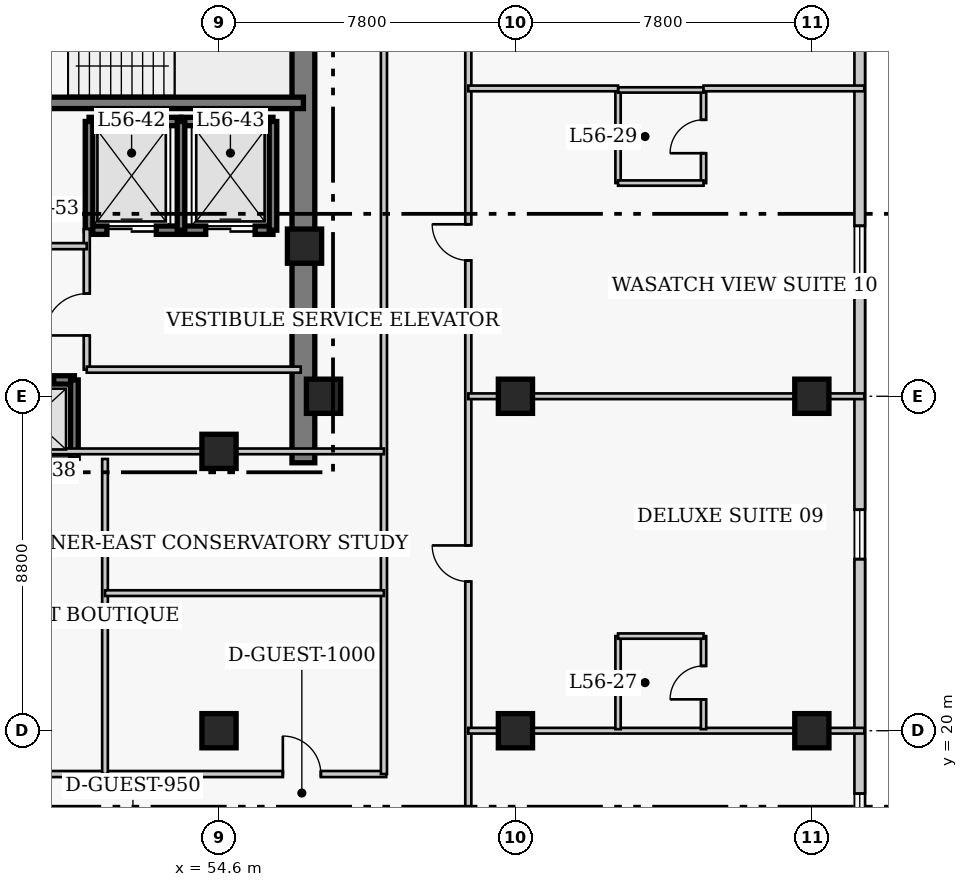
"""IFC4 building model, lengths in metres.
Left out: names, types, materials, properties, quantities, classifications, styles, units other than length and angle.
Written with IfcOpenShell. Run it as: python <this file> out.ifc"""

import sys

from ifc_helpers import new_model, si_unit, direction, frame, frame_2d, origin, origin_2d, place, context, subcontext, project, spatial, rectangle, extrude, element, fill, save


model = new_model("IFC4")
c1 = context("Model", 3, precision=1e-05, world=origin(), true_north=direction((0.0, 1.0)))
c2 = subcontext(c1, "Body", "Model", "MODEL_VIEW")
j1 = project(units=[si_unit("LENGTHUNIT", "METRE"), si_unit("PLANEANGLEUNIT", "RADIAN")], contexts=[c1])
p1 = place(None, origin())
s1 = spatial("IfcSite", under=j1, at=p1, CompositionType="ELEMENT")
p2 = place(p1, origin())
s2 = spatial("IfcBuilding", under=s1, at=p2, CompositionType="ELEMENT")
p3 = place(p2, frame((0.0, 0.0, 224.1)))
s3 = spatial("IfcBuildingStorey", under=s2, at=p3, CompositionType="ELEMENT", Elevation=224.1)
p4 = place(p3, frame((56.82, 27.05, 0.0), z_axis=(0.0, 0.0, 1.0), x_axis=(0.0, 1.0, 0.0)))
e1 = element("IfcWall", 1, at=p4, inside=s3, PredefinedType="SHEAR", context=c2, shape_type="SweptSolid", body=[
    extrude(rectangle(XDim=13.57, YDim=0.6, at=frame_2d((6.785, 0.0))), origin(), (0.0, 0.0, 1.0), 3.9),
])
p5 = place(p3, frame((48.45, 36.52, 0.0), z_axis=(0.0, 0.0, 1.0), x_axis=(1.0, 0.0, 0.0)))
e2 = element("IfcWall", 2, at=p5, inside=s3, PredefinedType="SHEAR", context=c2, shape_type="SweptSolid", body=[
    extrude(rectangle(XDim=8.37, YDim=0.3, at=frame_2d((4.185, 0.0))), origin(), (0.0, 0.0, 1.0), 3.9),
])
for number, where, z_axis, x_axis in (
    (3, (54.6, 20.0, 0.0), (0.0, 0.0, 1.0), (1.0, 0.0, 0.0)),
    (4, (62.4, 20.0, 0.0), (0.0, 0.0, 1.0), (1.0, 0.0, 0.0)),
    (5, (62.4, 28.8, 0.0), (0.0, 0.0, 1.0), (1.0, 0.0, 0.0)),
    (6, (70.2, 20.0, 0.0), (0.0, 0.0, 1.0), (1.0, 0.0, 0.0)),
    (7, (70.2, 28.8, 0.0), (0.0, 0.0, 1.0), (1.0, 0.0, 0.0)),
    (8, (57.35, 28.8, 0.0), (0.0, 0.0, 1.0), (1.0, 0.0, 0.0)),
    (9, (54.6, 27.35, 0.0), (0.0, 0.0, 1.0), (1.0, 0.0, 0.0)),
    (10, (56.85, 32.75, 0.0), (0.0, 0.0, 1.0), (1.0, 0.0, 0.0)),
):
    element("IfcColumn", number, at=place(p3, frame(where, z_axis=z_axis, x_axis=x_axis)), inside=s3, PredefinedType="COLUMN", context=c2, shape_type="SweptSolid", body=[
        extrude(rectangle(XDim=0.9, YDim=0.9, at=origin_2d()), origin(), (0.0, 0.0, 1.0), 3.9),
    ])
p6 = place(p3, frame((71.46, 13.96, 0.0), z_axis=(0.0, 0.0, 1.0), x_axis=(0.0, 1.0, 0.0)))
e11 = element("IfcWall", 11, at=p6, inside=s3, PredefinedType="SOLIDWALL", context=c2, shape_type="SweptSolid", body=[
    extrude(rectangle(XDim=29.88, YDim=0.28, at=frame_2d((14.94, 0.0))), origin(), (0.0, 0.0, 1.0), 3.65),
])
p7 = place(p6, frame((3.085, 0.0, 0.85)))
e12 = element("IfcOpeningElement", 12, at=p7, cuts=e11, PredefinedType="OPENING", context=c2, shape_type="SweptSolid", body=[
    extrude(rectangle(XDim=1.3, YDim=1.7, at=frame_2d((0.65, 0.85))), frame((0.0, 0.15, 0.0), z_axis=(0.0, -1.0, 0.0), x_axis=(1.0, 0.0, 0.0)), (0.0, 0.0, 1.0), 0.3),
])
p8 = place(p6, frame((10.555, 0.0, 0.85)))
e13 = element("IfcOpeningElement", 13, at=p8, cuts=e11, PredefinedType="OPENING", context=c2, shape_type="SweptSolid", body=[
    extrude(rectangle(XDim=1.3, YDim=1.7, at=frame_2d((0.65, 0.85))), frame((0.0, 0.15, 0.0), z_axis=(0.0, -1.0, 0.0), x_axis=(1.0, 0.0, 0.0)), (0.0, 0.0, 1.0), 0.3),
])
p9 = place(p6, frame((18.025, 0.0, 0.85)))
e14 = element("IfcOpeningElement", 14, at=p9, cuts=e11, PredefinedType="OPENING", context=c2, shape_type="SweptSolid", body=[
    extrude(rectangle(XDim=1.3, YDim=1.7, at=frame_2d((0.65, 0.85))), frame((0.0, 0.15, 0.0), z_axis=(0.0, -1.0, 0.0), x_axis=(1.0, 0.0, 0.0)), (0.0, 0.0, 1.0), 0.3),
])
p10 = place(p6, frame((25.495, 0.0, 0.85)))
e15 = element("IfcOpeningElement", 15, at=p10, cuts=e11, PredefinedType="OPENING", context=c2, shape_type="SweptSolid", body=[
    extrude(rectangle(XDim=1.3, YDim=1.7, at=frame_2d((0.65, 0.85))), frame((0.0, 0.15, 0.0), z_axis=(0.0, -1.0, 0.0), x_axis=(1.0, 0.0, 0.0)), (0.0, 0.0, 1.0), 0.3),
])
p11 = place(p3, frame((48.55, 29.23, 0.0), z_axis=(0.0, 0.0, 1.0), x_axis=(1.0, 0.0, 0.0)))
e16 = element("IfcWall", 16, at=p11, inside=s3, PredefinedType="SHEAR", context=c2, shape_type="SweptSolid", body=[
    extrude(rectangle(XDim=2.245, YDim=0.22, at=frame_2d((1.123, 0.0))), origin(), (0.0, 0.0, 1.0), 3.9),
])
p12 = place(p11, frame((0.6, 0.0, 0.0)))
e17 = element("IfcOpeningElement", 17, at=p12, cuts=e16, PredefinedType="OPENING", context=c2, shape_type="SweptSolid", body=[
    extrude(rectangle(XDim=1.1, YDim=2.15, at=frame_2d((0.55, 1.075))), frame((0.0, 0.12, 0.0), z_axis=(0.0, -1.0, 0.0), x_axis=(1.0, 0.0, 0.0)), (0.0, 0.0, 1.0), 0.24),
])
p13 = place(p3, frame((48.55, 27.17, 0.0), z_axis=(0.0, 0.0, 1.0), x_axis=(1.0, 0.0, 0.0)))
e18 = element("IfcWall", 18, at=p13, inside=s3, PredefinedType="SHEAR", context=c2, shape_type="SweptSolid", body=[
    extrude(rectangle(XDim=2.245, YDim=0.22, at=frame_2d((1.123, 0.0))), origin(), (0.0, 0.0, 1.0), 3.9),
])
p14 = place(p3, frame((50.795, 27.17, 0.0), z_axis=(0.0, 0.0, 1.0), x_axis=(0.0, 1.0, 0.0)))
e19 = element("IfcWall", 19, at=p14, inside=s3, PredefinedType="SHEAR", context=c2, shape_type="SweptSolid", body=[
    extrude(rectangle(XDim=2.06, YDim=0.2, at=frame_2d((1.03, 0.0))), origin(), (0.0, 0.0, 1.0), 3.9),
])
p15 = place(p3, frame((51.18, 36.03, 0.0), z_axis=(0.0, 0.0, 1.0), x_axis=(1.0, 0.0, 0.0)))
e20 = element("IfcWall", 20, at=p15, inside=s3, PredefinedType="SHEAR", context=c2, shape_type="SweptSolid", body=[
    extrude(rectangle(XDim=2.42, YDim=0.22, at=frame_2d((1.21, 0.0))), origin(), (0.0, 0.0, 1.0), 3.9),
])
p16 = place(p3, frame((51.18, 33.17, 0.0), z_axis=(0.0, 0.0, 1.0), x_axis=(1.0, 0.0, 0.0)))
e21 = element("IfcWall", 21, at=p16, inside=s3, PredefinedType="SHEAR", context=c2, shape_type="SweptSolid", body=[
    extrude(rectangle(XDim=2.42, YDim=0.22, at=frame_2d((1.21, 0.0))), origin(), (0.0, 0.0, 1.0), 3.9),
])
p17 = place(p16, frame((0.47, 0.0, 0.0)))
e22 = element("IfcOpeningElement", 22, at=p17, cuts=e21, PredefinedType="OPENING", context=c2, shape_type="SweptSolid", body=[
    extrude(rectangle(XDim=1.3, YDim=2.15, at=frame_2d((0.65, 1.075))), frame((0.0, 0.12, 0.0), z_axis=(0.0, -1.0, 0.0), x_axis=(1.0, 0.0, 0.0)), (0.0, 0.0, 1.0), 0.24),
])
p18 = place(p3, frame((51.18, 33.17, 0.0), z_axis=(0.0, 0.0, 1.0), x_axis=(0.0, 1.0, 0.0)))
e23 = element("IfcWall", 23, at=p18, inside=s3, PredefinedType="SHEAR", context=c2, shape_type="SweptSolid", body=[
    extrude(rectangle(XDim=2.86, YDim=0.2, at=frame_2d((1.43, 0.0))), origin(), (0.0, 0.0, 1.0), 3.9),
])
p19 = place(p3, frame((53.6, 36.03, 0.0), z_axis=(0.0, 0.0, 1.0), x_axis=(1.0, 0.0, 0.0)))
e24 = element("IfcWall", 24, at=p19, inside=s3, PredefinedType="SHEAR", context=c2, shape_type="SweptSolid", body=[
    extrude(rectangle(XDim=2.42, YDim=0.22, at=frame_2d((1.21, 0.0))), origin(), (0.0, 0.0, 1.0), 3.9),
])
p20 = place(p3, frame((53.6, 33.17, 0.0), z_axis=(0.0, 0.0, 1.0), x_axis=(1.0, 0.0, 0.0)))
e25 = element("IfcWall", 25, at=p20, inside=s3, PredefinedType="SHEAR", context=c2, shape_type="SweptSolid", body=[
    extrude(rectangle(XDim=2.42, YDim=0.22, at=frame_2d((1.21, 0.0))), origin(), (0.0, 0.0, 1.0), 3.9),
])
p21 = place(p20, frame((0.65, 0.0, 0.0)))
e26 = element("IfcOpeningElement", 26, at=p21, cuts=e25, PredefinedType="OPENING", context=c2, shape_type="SweptSolid", body=[
    extrude(rectangle(XDim=1.3, YDim=2.15, at=frame_2d((0.65, 1.075))), frame((0.0, 0.12, 0.0), z_axis=(0.0, -1.0, 0.0), x_axis=(1.0, 0.0, 0.0)), (0.0, 0.0, 1.0), 0.24),
])
for number, where, z_axis, x_axis in (
    (27, (53.6, 33.17, 0.0), (0.0, 0.0, 1.0), (0.0, 1.0, 0.0)),
    (28, (56.02, 33.17, 0.0), (0.0, 0.0, 1.0), (0.0, 1.0, 0.0)),
):
    element("IfcWall", number, at=place(p3, frame(where, z_axis=z_axis, x_axis=x_axis)), inside=s3, PredefinedType="SHEAR", context=c2, shape_type="SweptSolid", body=[
        extrude(rectangle(XDim=2.86, YDim=0.2, at=frame_2d((1.43, 0.0))), origin(), (0.0, 0.0, 1.0), 3.9),
    ])
p22 = place(p3, frame((51.12, 29.5, 0.0), z_axis=(0.0, 0.0, 1.0), x_axis=(0.0, 1.0, 0.0)))
e29 = element("IfcWall", 29, at=p22, inside=s3, PredefinedType="PARTITIONING", context=c2, shape_type="SweptSolid", body=[
    extrude(rectangle(XDim=3.7, YDim=0.16, at=frame_2d((1.85, 0.0))), origin(), (0.0, 0.0, 1.0), 3.65),
])
p23 = place(p22, frame((0.9, 0.0, 0.0)))
e30 = element("IfcOpeningElement", 30, at=p23, cuts=e29, PredefinedType="OPENING", context=c2, shape_type="SweptSolid", body=[
    extrude(rectangle(XDim=1.1, YDim=2.15, at=frame_2d((0.55, 1.075))), frame((0.0, 0.09, 0.0), z_axis=(0.0, -1.0, 0.0), x_axis=(1.0, 0.0, 0.0)), (0.0, 0.0, 1.0), 0.18),
])
p24 = place(p3, frame((51.12, 29.5, 0.0), z_axis=(0.0, 0.0, 1.0), x_axis=(1.0, 0.0, 0.0)))
e31 = element("IfcWall", 31, at=p24, inside=s3, PredefinedType="PARTITIONING", context=c2, shape_type="SweptSolid", body=[
    extrude(rectangle(XDim=5.63, YDim=0.16, at=frame_2d((2.815, 0.0))), origin(), (0.0, 0.0, 1.0), 3.65),
])
p25 = place(p3, frame((48.92, 32.75, 0.0), z_axis=(0.0, 0.0, 1.0), x_axis=(1.0, 0.0, 0.0)))
e32 = element("IfcWall", 32, at=p25, inside=s3, PredefinedType="PARTITIONING", context=c2, shape_type="SweptSolid", body=[
    extrude(rectangle(XDim=2.2, YDim=0.16, at=frame_2d((1.1, 0.0))), origin(), (0.0, 0.0, 1.0), 3.65),
])
p26 = place(p3, frame((35.85, 18.86, 0.0), z_axis=(0.0, 0.0, 1.0), x_axis=(1.0, 0.0, 0.0)))
e33 = element("IfcWall", 33, at=p26, inside=s3, PredefinedType="PARTITIONING", context=c2, shape_type="SweptSolid", body=[
    extrude(rectangle(XDim=23.15, YDim=0.16, at=frame_2d((11.575, 0.0))), origin(), (0.0, 0.0, 1.0), 3.65),
])
p27 = place(p26, frame((7.181, 0.0, 0.0)))
e34 = element("IfcOpeningElement", 34, at=p27, cuts=e33, PredefinedType="OPENING", context=c2, shape_type="SweptSolid", body=[
    extrude(rectangle(XDim=1.0, YDim=2.15, at=frame_2d((0.5, 1.075))), frame((0.0, 0.09, 0.0), z_axis=(0.0, -1.0, 0.0), x_axis=(1.0, 0.0, 0.0)), (0.0, 0.0, 1.0), 0.18),
])
p28 = place(p26, frame((20.43, 0.0, 0.0)))
e35 = element("IfcOpeningElement", 35, at=p28, cuts=e33, PredefinedType="OPENING", context=c2, shape_type="SweptSolid", body=[
    extrude(rectangle(XDim=1.0, YDim=2.15, at=frame_2d((0.5, 1.075))), frame((0.0, 0.09, 0.0), z_axis=(0.0, -1.0, 0.0), x_axis=(1.0, 0.0, 0.0)), (0.0, 0.0, 1.0), 0.18),
])
p29 = place(p3, frame((61.16, 11.95, 0.0), z_axis=(0.0, 0.0, 1.0), x_axis=(0.0, 1.0, 0.0)))
e36 = element("IfcWall", 36, at=p29, inside=s3, PredefinedType="PARTITIONING", context=c2, shape_type="SweptSolid", body=[
    extrude(rectangle(XDim=28.7, YDim=0.16, at=frame_2d((14.35, 0.0))), origin(), (0.0, 0.0, 1.0), 3.65),
])
p30 = place(p29, frame((3.55, 0.0, 0.0)))
e37 = element("IfcOpeningElement", 37, at=p30, cuts=e36, PredefinedType="OPENING", context=c2, shape_type="SweptSolid", body=[
    extrude(rectangle(XDim=0.95, YDim=2.1, at=frame_2d((0.475, 1.05))), frame((0.0, 0.09, 0.0), z_axis=(0.0, -1.0, 0.0), x_axis=(1.0, 0.0, 0.0)), (0.0, 0.0, 1.0), 0.18),
])
p31 = place(p29, frame((11.975, 0.0, 0.0)))
e38 = element("IfcOpeningElement", 38, at=p31, cuts=e36, PredefinedType="OPENING", context=c2, shape_type="SweptSolid", body=[
    extrude(rectangle(XDim=0.95, YDim=2.1, at=frame_2d((0.475, 1.05))), frame((0.0, 0.09, 0.0), z_axis=(0.0, -1.0, 0.0), x_axis=(1.0, 0.0, 0.0)), (0.0, 0.0, 1.0), 0.18),
])
p32 = place(p29, frame((20.425, 0.0, 0.0)))
e39 = element("IfcOpeningElement", 39, at=p32, cuts=e36, PredefinedType="OPENING", context=c2, shape_type="SweptSolid", body=[
    extrude(rectangle(XDim=0.95, YDim=2.1, at=frame_2d((0.475, 1.05))), frame((0.0, 0.09, 0.0), z_axis=(0.0, -1.0, 0.0), x_axis=(1.0, 0.0, 0.0)), (0.0, 0.0, 1.0), 0.18),
])
p33 = place(p29, frame((27.26, 0.0, 0.0)))
e40 = element("IfcOpeningElement", 40, at=p33, cuts=e36, PredefinedType="OPENING", context=c2, shape_type="SweptSolid", body=[
    extrude(rectangle(XDim=1.0, YDim=2.15, at=frame_2d((0.5, 1.075))), frame((0.0, 0.09, 0.0), z_axis=(0.0, -1.0, 0.0), x_axis=(1.0, 0.0, 0.0)), (0.0, 0.0, 1.0), 0.18),
])
p34 = place(p3, frame((58.94, 18.86, 0.0), z_axis=(0.0, 0.0, 1.0), x_axis=(0.0, 1.0, 0.0)))
e41 = element("IfcWall", 41, at=p34, inside=s3, PredefinedType="PARTITIONING", context=c2, shape_type="SweptSolid", body=[
    extrude(rectangle(XDim=21.79, YDim=0.16, at=frame_2d((10.895, 0.0))), origin(), (0.0, 0.0, 1.0), 3.65),
])
p35 = place(p3, frame((51.6, 18.86, 0.0), z_axis=(0.0, 0.0, 1.0), x_axis=(0.0, 1.0, 0.0)))
e42 = element("IfcWall", 42, at=p35, inside=s3, PredefinedType="PARTITIONING", context=c2, shape_type="SweptSolid", body=[
    extrude(rectangle(XDim=8.29, YDim=0.15, at=frame_2d((4.145, 0.0))), origin(), (0.0, 0.0, 1.0), 3.65),
])
p36 = place(p3, frame((41.75, 27.35, 0.0), z_axis=(0.0, 0.0, 1.0), x_axis=(1.0, 0.0, 0.0)))
e43 = element("IfcWall", 43, at=p36, inside=s3, PredefinedType="PARTITIONING", context=c2, shape_type="SweptSolid", body=[
    extrude(rectangle(XDim=17.19, YDim=0.15, at=frame_2d((8.595, 0.0))), origin(), (0.0, 0.0, 1.0), 3.65),
])
p37 = place(p3, frame((51.6, 23.62, 0.0), z_axis=(0.0, 0.0, 1.0), x_axis=(1.0, 0.0, 0.0)))
e44 = element("IfcWall", 44, at=p37, inside=s3, PredefinedType="PARTITIONING", context=c2, shape_type="SweptSolid", body=[
    extrude(rectangle(XDim=7.34, YDim=0.15, at=frame_2d((3.67, 0.0))), origin(), (0.0, 0.0, 1.0), 3.65),
])
p38 = place(p3, frame((61.16, 20.0, 0.0), z_axis=(0.0, 0.0, 1.0), x_axis=(1.0, 0.0, 0.0)))
e45 = element("IfcWall", 45, at=p38, inside=s3, PredefinedType="PARTITIONING", context=c2, shape_type="SweptSolid", body=[
    extrude(rectangle(XDim=10.42, YDim=0.15, at=frame_2d((5.21, 0.0))), origin(), (0.0, 0.0, 1.0), 2.878),
])
p39 = place(p3, frame((65.1, 20.04, 0.0), z_axis=(0.0, 0.0, 1.0), x_axis=(0.0, 1.0, 0.0)))
e46 = element("IfcWall", 46, at=p39, inside=s3, PredefinedType="PLUMBINGWALL", context=c2, shape_type="SweptSolid", body=[
    extrude(rectangle(XDim=2.45, YDim=0.14, at=frame_2d((1.225, 0.0))), origin(), (0.0, 0.0, 1.0), 3.65),
])
p40 = place(p3, frame((67.35, 20.04, 0.0), z_axis=(0.0, 0.0, 1.0), x_axis=(0.0, 1.0, 0.0)))
e47 = element("IfcWall", 47, at=p40, inside=s3, PredefinedType="PLUMBINGWALL", context=c2, shape_type="SweptSolid", body=[
    extrude(rectangle(XDim=2.45, YDim=0.14, at=frame_2d((1.225, 0.0))), origin(), (0.0, 0.0, 1.0), 3.65),
])
p41 = place(p40, frame((0.785, 0.0, 0.0)))
e48 = element("IfcOpeningElement", 48, at=p41, cuts=e47, PredefinedType="OPENING", context=c2, shape_type="SweptSolid", body=[
    extrude(rectangle(XDim=0.88, YDim=2.05, at=frame_2d((0.44, 1.025))), frame((0.0, 0.08, 0.0), z_axis=(0.0, -1.0, 0.0), x_axis=(1.0, 0.0, 0.0)), (0.0, 0.0, 1.0), 0.16),
])
p42 = place(p3, frame((65.1, 22.49, 0.0), z_axis=(0.0, 0.0, 1.0), x_axis=(1.0, 0.0, 0.0)))
e49 = element("IfcWall", 49, at=p42, inside=s3, PredefinedType="PLUMBINGWALL", context=c2, shape_type="SweptSolid", body=[
    extrude(rectangle(XDim=2.25, YDim=0.14, at=frame_2d((1.125, 0.0))), origin(), (0.0, 0.0, 1.0), 3.65),
])
p43 = place(p3, frame((61.16, 28.8, 0.0), z_axis=(0.0, 0.0, 1.0), x_axis=(1.0, 0.0, 0.0)))
e50 = element("IfcWall", 50, at=p43, inside=s3, PredefinedType="PARTITIONING", context=c2, shape_type="SweptSolid", body=[
    extrude(rectangle(XDim=10.42, YDim=0.15, at=frame_2d((5.21, 0.0))), origin(), (0.0, 0.0, 1.0), 2.878),
])
p44 = place(p3, frame((65.1, 34.41, 0.0), z_axis=(0.0, 0.0, 1.0), x_axis=(0.0, 1.0, 0.0)))
e51 = element("IfcWall", 51, at=p44, inside=s3, PredefinedType="PLUMBINGWALL", context=c2, shape_type="SweptSolid", body=[
    extrude(rectangle(XDim=2.45, YDim=0.14, at=frame_2d((1.225, 0.0))), origin(), (0.0, 0.0, 1.0), 3.65),
])
p45 = place(p3, frame((67.35, 34.41, 0.0), z_axis=(0.0, 0.0, 1.0), x_axis=(0.0, 1.0, 0.0)))
e52 = element("IfcWall", 52, at=p45, inside=s3, PredefinedType="PLUMBINGWALL", context=c2, shape_type="SweptSolid", body=[
    extrude(rectangle(XDim=2.45, YDim=0.14, at=frame_2d((1.225, 0.0))), origin(), (0.0, 0.0, 1.0), 3.65),
])
p46 = place(p45, frame((0.785, 0.0, 0.0)))
e53 = element("IfcOpeningElement", 53, at=p46, cuts=e52, PredefinedType="OPENING", context=c2, shape_type="SweptSolid", body=[
    extrude(rectangle(XDim=0.88, YDim=2.05, at=frame_2d((0.44, 1.025))), frame((0.0, 0.08, 0.0), z_axis=(0.0, -1.0, 0.0), x_axis=(1.0, 0.0, 0.0)), (0.0, 0.0, 1.0), 0.16),
])
for number, where, z_axis, x_axis in (
    (54, (65.1, 34.41, 0.0), (0.0, 0.0, 1.0), (1.0, 0.0, 0.0)),
    (55, (65.1, 36.86, 0.0), (0.0, 0.0, 1.0), (1.0, 0.0, 0.0)),
):
    element("IfcWall", number, at=place(p3, frame(where, z_axis=z_axis, x_axis=x_axis)), inside=s3, PredefinedType="PLUMBINGWALL", context=c2, shape_type="SweptSolid", body=[
        extrude(rectangle(XDim=2.25, YDim=0.14, at=frame_2d((1.125, 0.0))), origin(), (0.0, 0.0, 1.0), 3.65),
    ])
p47 = place(p3, frame((61.16, 36.9, 0.0), z_axis=(0.0, 0.0, 1.0), x_axis=(1.0, 0.0, 0.0)))
e56 = element("IfcWall", 56, at=p47, inside=s3, PredefinedType="PARTITIONING", context=c2, shape_type="SweptSolid", body=[
    extrude(rectangle(XDim=3.94, YDim=0.15, at=frame_2d((1.97, 0.0))), origin(), (0.0, 0.0, 1.0), 3.65),
])
p48 = place(p3, frame((67.35, 36.9, 0.0), z_axis=(0.0, 0.0, 1.0), x_axis=(1.0, 0.0, 0.0)))
e57 = element("IfcWall", 57, at=p48, inside=s3, PredefinedType="PARTITIONING", context=c2, shape_type="SweptSolid", body=[
    extrude(rectangle(XDim=4.23, YDim=0.15, at=frame_2d((2.115, 0.0))), origin(), (0.0, 0.0, 1.0), 3.65),
])
p49 = place(p7, origin())
e58 = element("IfcWindow", 58, at=p49, inside=s3, PartitioningType="SINGLE_PANEL", PredefinedType="WINDOW", context=c2, shape_type="SweptSolid", body=[
    extrude(rectangle(XDim=1.3, YDim=1.7, at=frame_2d((0.65, 0.85))), frame((0.0, 0.03, 0.0), z_axis=(0.0, -1.0, 0.0), x_axis=(1.0, 0.0, 0.0)), (0.0, 0.0, 1.0), 0.06),
])
fill(e12, e58)
p50 = place(p8, origin())
e59 = element("IfcWindow", 59, at=p50, inside=s3, PartitioningType="SINGLE_PANEL", PredefinedType="WINDOW", context=c2, shape_type="SweptSolid", body=[
    extrude(rectangle(XDim=1.3, YDim=1.7, at=frame_2d((0.65, 0.85))), frame((0.0, 0.03, 0.0), z_axis=(0.0, -1.0, 0.0), x_axis=(1.0, 0.0, 0.0)), (0.0, 0.0, 1.0), 0.06),
])
fill(e13, e59)
p51 = place(p9, origin())
e60 = element("IfcWindow", 60, at=p51, inside=s3, PartitioningType="SINGLE_PANEL", PredefinedType="WINDOW", context=c2, shape_type="SweptSolid", body=[
    extrude(rectangle(XDim=1.3, YDim=1.7, at=frame_2d((0.65, 0.85))), frame((0.0, 0.03, 0.0), z_axis=(0.0, -1.0, 0.0), x_axis=(1.0, 0.0, 0.0)), (0.0, 0.0, 1.0), 0.06),
])
fill(e14, e60)
p52 = place(p12, origin())
e61 = element("IfcDoor", 61, at=p52, inside=s3, OperationType="DOUBLE_DOOR_SLIDING", PredefinedType="DOOR", context=c2, shape_type="SweptSolid", body=[
    extrude(rectangle(XDim=1.1, YDim=2.15, at=frame_2d((0.55, 1.075))), frame((0.0, 0.025, 0.0), z_axis=(0.0, -1.0, 0.0), x_axis=(1.0, 0.0, 0.0)), (0.0, 0.0, 1.0), 0.05),
])
fill(e17, e61)
p53 = place(p17, origin())
e62 = element("IfcDoor", 62, at=p53, inside=s3, OperationType="DOUBLE_DOOR_SLIDING", PredefinedType="DOOR", context=c2, shape_type="SweptSolid", body=[
    extrude(rectangle(XDim=1.3, YDim=2.15, at=frame_2d((0.65, 1.075))), frame((0.0, 0.025, 0.0), z_axis=(0.0, -1.0, 0.0), x_axis=(1.0, 0.0, 0.0)), (0.0, 0.0, 1.0), 0.05),
])
fill(e22, e62)
p54 = place(p21, origin())
e63 = element("IfcDoor", 63, at=p54, inside=s3, OperationType="DOUBLE_DOOR_SLIDING", PredefinedType="DOOR", context=c2, shape_type="SweptSolid", body=[
    extrude(rectangle(XDim=1.3, YDim=2.15, at=frame_2d((0.65, 1.075))), frame((0.0, 0.025, 0.0), z_axis=(0.0, -1.0, 0.0), x_axis=(1.0, 0.0, 0.0)), (0.0, 0.0, 1.0), 0.05),
])
fill(e26, e63)
p55 = place(p23, origin())
e64 = element("IfcDoor", 64, at=p55, inside=s3, OperationType="SINGLE_SWING_LEFT", PredefinedType="DOOR", context=c2, shape_type="SweptSolid", body=[
    extrude(rectangle(XDim=1.1, YDim=2.15, at=frame_2d((0.55, 1.075))), frame((0.0, 0.025, 0.0), z_axis=(0.0, -1.0, 0.0), x_axis=(1.0, 0.0, 0.0)), (0.0, 0.0, 1.0), 0.05),
])
fill(e30, e64)
p56 = place(p28, origin())
e65 = element("IfcDoor", 65, at=p56, inside=s3, OperationType="SINGLE_SWING_LEFT", PredefinedType="DOOR", context=c2, shape_type="SweptSolid", body=[
    extrude(rectangle(XDim=1.0, YDim=2.15, at=frame_2d((0.5, 1.075))), frame((0.0, 0.025, 0.0), z_axis=(0.0, -1.0, 0.0), x_axis=(1.0, 0.0, 0.0)), (0.0, 0.0, 1.0), 0.05),
])
fill(e35, e65)
p57 = place(p41, origin())
e66 = element("IfcDoor", 66, at=p57, inside=s3, OperationType="SINGLE_SWING_LEFT", PredefinedType="DOOR", context=c2, shape_type="SweptSolid", body=[
    extrude(rectangle(XDim=0.88, YDim=2.05, at=frame_2d((0.44, 1.025))), frame((0.0, 0.025, 0.0), z_axis=(0.0, -1.0, 0.0), x_axis=(1.0, 0.0, 0.0)), (0.0, 0.0, 1.0), 0.05),
])
fill(e48, e66)
p58 = place(p31, origin())
e67 = element("IfcDoor", 67, at=p58, inside=s3, OperationType="SINGLE_SWING_RIGHT", PredefinedType="DOOR", context=c2, shape_type="SweptSolid", body=[
    extrude(rectangle(XDim=0.95, YDim=2.1, at=frame_2d((0.475, 1.05))), frame((0.0, 0.025, 0.0), z_axis=(0.0, -1.0, 0.0), x_axis=(1.0, 0.0, 0.0)), (0.0, 0.0, 1.0), 0.05),
])
fill(e38, e67)
p59 = place(p46, origin())
e68 = element("IfcDoor", 68, at=p59, inside=s3, OperationType="SINGLE_SWING_LEFT", PredefinedType="DOOR", context=c2, shape_type="SweptSolid", body=[
    extrude(rectangle(XDim=0.88, YDim=2.05, at=frame_2d((0.44, 1.025))), frame((0.0, 0.025, 0.0), z_axis=(0.0, -1.0, 0.0), x_axis=(1.0, 0.0, 0.0)), (0.0, 0.0, 1.0), 0.05),
])
fill(e53, e68)
p60 = place(p32, origin())
e69 = element("IfcDoor", 69, at=p60, inside=s3, OperationType="SINGLE_SWING_RIGHT", PredefinedType="DOOR", context=c2, shape_type="SweptSolid", body=[
    extrude(rectangle(XDim=0.95, YDim=2.1, at=frame_2d((0.475, 1.05))), frame((0.0, 0.025, 0.0), z_axis=(0.0, -1.0, 0.0), x_axis=(1.0, 0.0, 0.0)), (0.0, 0.0, 1.0), 0.05),
])
fill(e39, e69)
save(model, sys.argv[1])
